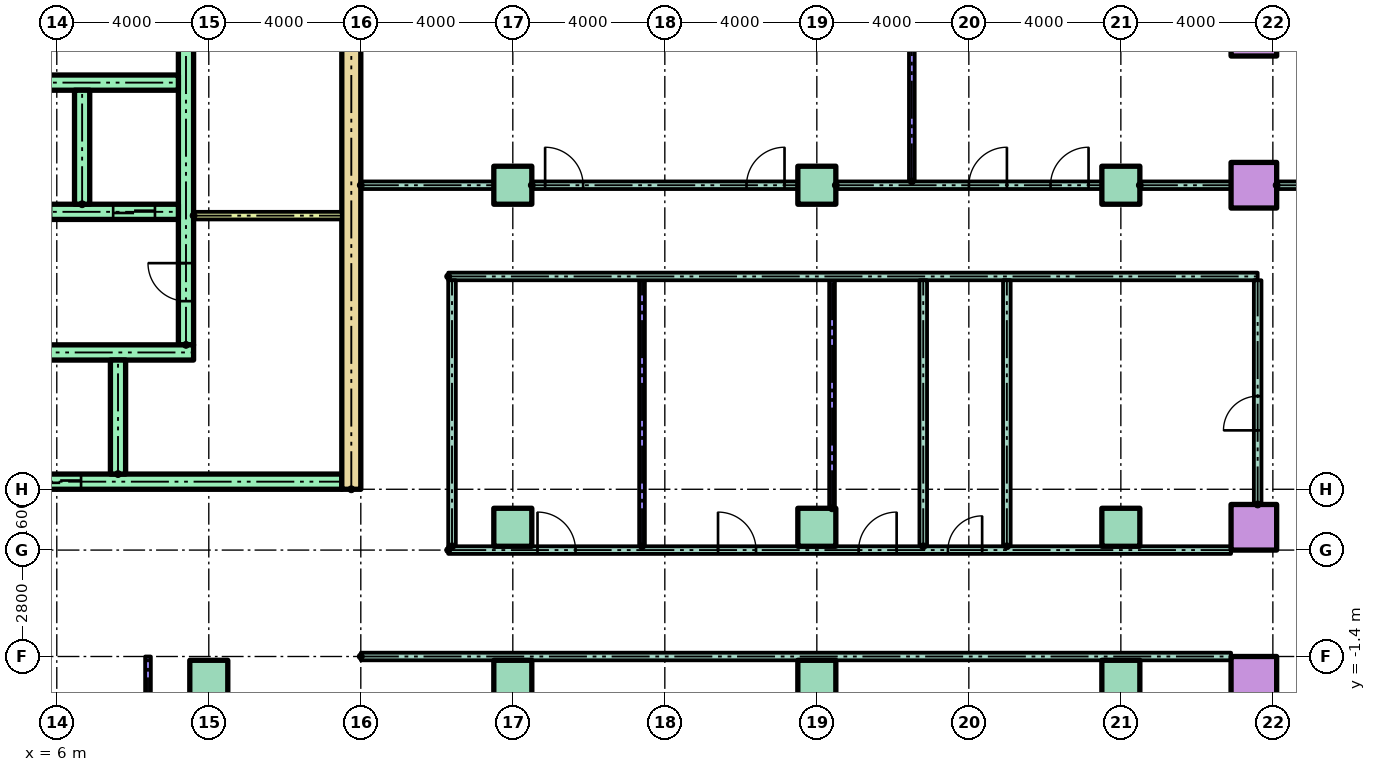
"""IFC4 building model, lengths in metres.
Left out: names, types, materials, properties, quantities, classifications, styles, units other than length and angle.
Written with IfcOpenShell. Run it as: python <this file> out.ifc"""

import sys

from ifc_helpers import new_model, si_unit, direction, frame, frame_2d, origin, origin_2d, place, context, subcontext, project, spatial, rectangle, hollow_rectangle, extrude, element, fill, save


model = new_model("IFC4")
c1 = context("Model", 3, precision=1e-05, world=origin(), true_north=direction((0.0, 1.0)))
c2 = subcontext(c1, "Body", "Model", "MODEL_VIEW")
j1 = project(units=[si_unit("LENGTHUNIT", "METRE"), si_unit("PLANEANGLEUNIT", "RADIAN")], contexts=[c1])
p1 = place(None, origin())
s1 = spatial("IfcSite", under=j1, at=p1, CompositionType="ELEMENT")
p2 = place(p1, origin())
s2 = spatial("IfcBuilding", under=s1, at=p2, CompositionType="ELEMENT")
p3 = place(p2, frame((0.0, 0.0, 22.0)))
s3 = spatial("IfcBuildingStorey", under=s2, at=p3, CompositionType="ELEMENT", Elevation=22.0)
for number, where in (
    (1, (10.0, -2.0, 0.0)),
    (2, (18.0, -2.0, 0.0)),
    (3, (26.0, -2.0, 0.0)),
    (4, (34.0, -2.0, 0.0)),
):
    element("IfcColumn", number, at=place(p3, frame(where)), inside=s3, PredefinedType="COLUMN", context=c2, shape_type="SweptSolid", body=[
        extrude(rectangle(XDim=1.0, YDim=1.0, at=origin_2d()), origin(), (0.0, 0.0, 1.0), 4.0),
    ])
p4 = place(p3, frame((37.5, -2.0, 0.0)))
e5 = element("IfcColumn", 5, at=p4, inside=s3, PredefinedType="COLUMN", context=c2, shape_type="SweptSolid", body=[
    extrude(hollow_rectangle(XDim=1.2, YDim=1.2, WallThickness=0.06, at=origin_2d()), origin(), (0.0, 0.0, 1.0), 4.0),
])
for number, where in (
    (6, (18.0, 2.0, 0.0)),
    (7, (26.0, 2.0, 0.0)),
    (8, (34.0, 2.0, 0.0)),
):
    element("IfcColumn", number, at=place(p3, frame(where)), inside=s3, PredefinedType="COLUMN", context=c2, shape_type="SweptSolid", body=[
        extrude(rectangle(XDim=1.0, YDim=1.0, at=origin_2d()), origin(), (0.0, 0.0, 1.0), 4.0),
    ])
p5 = place(p3, frame((37.5, 2.0, 0.0)))
e9 = element("IfcColumn", 9, at=p5, inside=s3, PredefinedType="COLUMN", context=c2, shape_type="SweptSolid", body=[
    extrude(hollow_rectangle(XDim=1.2, YDim=1.2, WallThickness=0.06, at=origin_2d()), origin(), (0.0, 0.0, 1.0), 4.0),
])
for number, where in (
    (10, (18.0, 11.0, 0.0)),
    (11, (26.0, 11.0, 0.0)),
    (12, (34.0, 11.0, 0.0)),
):
    element("IfcColumn", number, at=place(p3, frame(where)), inside=s3, PredefinedType="COLUMN", context=c2, shape_type="SweptSolid", body=[
        extrude(rectangle(XDim=1.0, YDim=1.0, at=origin_2d()), origin(), (0.0, 0.0, 1.0), 4.0),
    ])
for number, where in (
    (13, (37.5, 11.0, 0.0)),
    (14, (37.5, 15.0, 0.0)),
):
    element("IfcColumn", number, at=place(p3, frame(where)), inside=s3, PredefinedType="COLUMN", context=c2, shape_type="SweptSolid", body=[
        extrude(hollow_rectangle(XDim=1.2, YDim=1.2, WallThickness=0.06, at=origin_2d()), origin(), (0.0, 0.0, 1.0), 4.0),
    ])
p6 = place(p3, frame((13.75, 3.0, 0.0), z_axis=(0.0, 0.0, 1.0), x_axis=(0.0, 1.0, 0.0)))
e15 = element("IfcWall", 15, at=p6, inside=s3, PredefinedType="SHEAR", context=c2, shape_type="SweptSolid", body=[
    extrude(rectangle(XDim=17.0, YDim=0.5, at=frame_2d((8.5, 0.0))), origin(), (0.0, 0.0, 1.0), 3.2),
])
p7 = place(p3, frame((9.4, 6.8, 0.0), z_axis=(0.0, 0.0, 1.0), x_axis=(0.0, 1.0, 0.0)))
e16 = element("IfcWall", 16, at=p7, inside=s3, PredefinedType="SHEAR", context=c2, shape_type="SweptSolid", body=[
    extrude(rectangle(XDim=12.7, YDim=0.4, at=frame_2d((6.35, 0.0))), origin(), (0.0, 0.0, 1.0), 3.2),
])
p8 = place(p7, frame((1.15, 0.0, 0.0)))
e17 = element("IfcOpeningElement", 17, at=p8, cuts=e16, PredefinedType="OPENING", context=c2, shape_type="SweptSolid", body=[
    extrude(rectangle(XDim=1.0, YDim=2.1, at=frame_2d((0.5, 1.05))), frame((0.0, 0.21, 0.0), z_axis=(0.0, -1.0, 0.0), x_axis=(1.0, 0.0, 0.0)), (0.0, 0.0, 1.0), 0.42),
])
p9 = place(p7, frame((7.925, 0.0, 0.0)))
e18 = element("IfcOpeningElement", 18, at=p9, cuts=e16, PredefinedType="OPENING", context=c2, shape_type="SweptSolid", body=[
    extrude(rectangle(XDim=1.0, YDim=2.1, at=frame_2d((0.5, 1.05))), frame((0.0, 0.21, 0.0), z_axis=(0.0, -1.0, 0.0), x_axis=(1.0, 0.0, 0.0)), (0.0, 0.0, 1.0), 0.42),
])
p10 = place(p3, frame((-13.5, 3.2, 0.0)))
e19 = element("IfcWall", 19, at=p10, inside=s3, PredefinedType="SHEAR", context=c2, shape_type="SweptSolid", body=[
    extrude(rectangle(XDim=27.0, YDim=0.4, at=frame_2d((13.5, 0.0))), origin(), (0.0, 0.0, 1.0), 3.2),
])
p11 = place(p10, frame((6.861, 0.0, 0.0)))
e20 = element("IfcOpeningElement", 20, at=p11, cuts=e19, PredefinedType="OPENING", context=c2, shape_type="SweptSolid", body=[
    extrude(rectangle(XDim=1.1, YDim=2.1, at=frame_2d((0.55, 1.05))), frame((0.0, 0.21, 0.0), z_axis=(0.0, -1.0, 0.0), x_axis=(1.0, 0.0, 0.0)), (0.0, 0.0, 1.0), 0.42),
])
p12 = place(p10, frame((9.906, 0.0, 0.0)))
e21 = element("IfcOpeningElement", 21, at=p12, cuts=e19, PredefinedType="OPENING", context=c2, shape_type="SweptSolid", body=[
    extrude(rectangle(XDim=1.1, YDim=2.1, at=frame_2d((0.55, 1.05))), frame((0.0, 0.21, 0.0), z_axis=(0.0, -1.0, 0.0), x_axis=(1.0, 0.0, 0.0)), (0.0, 0.0, 1.0), 0.42),
])
p13 = place(p10, frame((15.994, 0.0, 0.0)))
e22 = element("IfcOpeningElement", 22, at=p13, cuts=e19, PredefinedType="OPENING", context=c2, shape_type="SweptSolid", body=[
    extrude(rectangle(XDim=1.1, YDim=2.1, at=frame_2d((0.55, 1.05))), frame((0.0, 0.21, 0.0), z_axis=(0.0, -1.0, 0.0), x_axis=(1.0, 0.0, 0.0)), (0.0, 0.0, 1.0), 0.42),
])
p14 = place(p10, frame((19.039, 0.0, 0.0)))
e23 = element("IfcOpeningElement", 23, at=p14, cuts=e19, PredefinedType="OPENING", context=c2, shape_type="SweptSolid", body=[
    extrude(rectangle(XDim=1.1, YDim=2.1, at=frame_2d((0.55, 1.05))), frame((0.0, 0.21, 0.0), z_axis=(0.0, -1.0, 0.0), x_axis=(1.0, 0.0, 0.0)), (0.0, 0.0, 1.0), 0.42),
])
p15 = place(p10, frame((12.6, 0.0, 0.0)))
e24 = element("IfcOpeningElement", 24, at=p15, cuts=e19, PredefinedType="OPENING", context=c2, shape_type="SweptSolid", body=[
    extrude(rectangle(XDim=1.8, YDim=2.1, at=frame_2d((0.9, 1.05))), frame((0.0, 0.21, 0.0), z_axis=(0.0, -1.0, 0.0), x_axis=(1.0, 0.0, 0.0)), (0.0, 0.0, 1.0), 0.42),
])
p16 = place(p3, frame((1.522, 6.6, 0.0)))
e25 = element("IfcWall", 25, at=p16, inside=s3, PredefinedType="SHEAR", context=c2, shape_type="SweptSolid", body=[
    extrude(rectangle(XDim=8.078, YDim=0.4, at=frame_2d((4.039, 0.0))), origin(), (0.0, 0.0, 1.0), 3.2),
])
p17 = place(p3, frame((7.611, 3.4, 0.0), z_axis=(0.0, 0.0, 1.0), x_axis=(0.0, 1.0, 0.0)))
e26 = element("IfcWall", 26, at=p17, inside=s3, PredefinedType="SHEAR", context=c2, shape_type="SweptSolid", body=[
    extrude(rectangle(XDim=3.0, YDim=0.4, at=frame_2d((1.5, 0.0))), origin(), (0.0, 0.0, 1.0), 3.2),
])
p18 = place(p3, frame((1.2, 10.3, 0.0)))
e27 = element("IfcWall", 27, at=p18, inside=s3, PredefinedType="SHEAR", context=c2, shape_type="SweptSolid", body=[
    extrude(rectangle(XDim=8.0, YDim=0.4, at=frame_2d((4.0, 0.0))), origin(), (0.0, 0.0, 1.0), 3.2),
])
p19 = place(p18, frame((3.55, 0.0, 0.0)))
e28 = element("IfcOpeningElement", 28, at=p19, cuts=e27, PredefinedType="OPENING", context=c2, shape_type="SweptSolid", body=[
    extrude(rectangle(XDim=1.1, YDim=2.1, at=frame_2d((0.55, 1.05))), frame((0.0, 0.21, 0.0), z_axis=(0.0, -1.0, 0.0), x_axis=(1.0, 0.0, 0.0)), (0.0, 0.0, 1.0), 0.42),
])
p20 = place(p18, frame((6.283, 0.0, 0.0)))
e29 = element("IfcOpeningElement", 29, at=p20, cuts=e27, PredefinedType="OPENING", context=c2, shape_type="SweptSolid", body=[
    extrude(rectangle(XDim=1.1, YDim=2.1, at=frame_2d((0.55, 1.05))), frame((0.0, 0.21, 0.0), z_axis=(0.0, -1.0, 0.0), x_axis=(1.0, 0.0, 0.0)), (0.0, 0.0, 1.0), 0.42),
])
p21 = place(p18, frame((0.867, 0.0, 0.0)))
e30 = element("IfcOpeningElement", 30, at=p21, cuts=e27, PredefinedType="OPENING", context=c2, shape_type="SweptSolid", body=[
    extrude(rectangle(XDim=1.0, YDim=2.1, at=frame_2d((0.5, 1.05))), frame((0.0, 0.21, 0.0), z_axis=(0.0, -1.0, 0.0), x_axis=(1.0, 0.0, 0.0)), (0.0, 0.0, 1.0), 0.42),
])
p22 = place(p3, frame((1.2, 13.7, 0.0)))
e31 = element("IfcWall", 31, at=p22, inside=s3, PredefinedType="SHEAR", context=c2, shape_type="SweptSolid", body=[
    extrude(rectangle(XDim=8.0, YDim=0.4, at=frame_2d((4.0, 0.0))), origin(), (0.0, 0.0, 1.0), 3.2),
])
p23 = place(p3, frame((6.667, 10.5, 0.0), z_axis=(0.0, 0.0, 1.0), x_axis=(0.0, 1.0, 0.0)))
e32 = element("IfcWall", 32, at=p23, inside=s3, PredefinedType="SHEAR", context=c2, shape_type="SweptSolid", body=[
    extrude(rectangle(XDim=3.0, YDim=0.4, at=frame_2d((1.5, 0.0))), origin(), (0.0, 0.0, 1.0), 3.2),
])
p24 = place(p3, frame((9.6, 10.2, 0.0)))
e33 = element("IfcWall", 33, at=p24, inside=s3, PredefinedType="PARTITIONING", context=c2, shape_type="SweptSolid", body=[
    extrude(rectangle(XDim=3.9, YDim=0.2, at=frame_2d((1.95, 0.0))), origin(), (0.0, 0.0, 1.0), 3.2),
])
p25 = place(p3, frame((14.0, -1.4, 0.0)))
e34 = element("IfcWall", 34, at=p25, inside=s3, PredefinedType="PARTITIONING", context=c2, shape_type="SweptSolid", body=[
    extrude(rectangle(XDim=22.9, YDim=0.2, at=frame_2d((11.45, 0.0))), origin(), (0.0, 0.0, 1.0), 3.2),
])
p26 = place(p3, frame((16.3, 1.4, 0.0)))
e35 = element("IfcWall", 35, at=p26, inside=s3, PredefinedType="PARTITIONING", context=c2, shape_type="SweptSolid", body=[
    extrude(rectangle(XDim=20.6, YDim=0.2, at=frame_2d((10.3, 0.0))), origin(), (0.0, 0.0, 1.0), 3.2),
])
p27 = place(p26, frame((2.35, 0.0, 0.0)))
e36 = element("IfcOpeningElement", 36, at=p27, cuts=e35, PredefinedType="OPENING", context=c2, shape_type="SweptSolid", body=[
    extrude(rectangle(XDim=1.0, YDim=2.1, at=frame_2d((0.5, 1.05))), frame((0.0, 0.11, 0.0), z_axis=(0.0, -1.0, 0.0), x_axis=(1.0, 0.0, 0.0)), (0.0, 0.0, 1.0), 0.22),
])
p28 = place(p26, frame((7.1, 0.0, 0.0)))
e37 = element("IfcOpeningElement", 37, at=p28, cuts=e35, PredefinedType="OPENING", context=c2, shape_type="SweptSolid", body=[
    extrude(rectangle(XDim=1.0, YDim=2.1, at=frame_2d((0.5, 1.05))), frame((0.0, 0.11, 0.0), z_axis=(0.0, -1.0, 0.0), x_axis=(1.0, 0.0, 0.0)), (0.0, 0.0, 1.0), 0.22),
])
p29 = place(p26, frame((10.8, 0.0, 0.0)))
e38 = element("IfcOpeningElement", 38, at=p29, cuts=e35, PredefinedType="OPENING", context=c2, shape_type="SweptSolid", body=[
    extrude(rectangle(XDim=1.0, YDim=2.1, at=frame_2d((0.5, 1.05))), frame((0.0, 0.11, 0.0), z_axis=(0.0, -1.0, 0.0), x_axis=(1.0, 0.0, 0.0)), (0.0, 0.0, 1.0), 0.22),
])
p30 = place(p26, frame((13.15, 0.0, 0.0)))
e39 = element("IfcOpeningElement", 39, at=p30, cuts=e35, PredefinedType="OPENING", context=c2, shape_type="SweptSolid", body=[
    extrude(rectangle(XDim=0.9, YDim=2.1, at=frame_2d((0.45, 1.05))), frame((0.0, 0.11, 0.0), z_axis=(0.0, -1.0, 0.0), x_axis=(1.0, 0.0, 0.0)), (0.0, 0.0, 1.0), 0.22),
])
p31 = place(p3, frame((16.3, 8.6, 0.0)))
e40 = element("IfcWall", 40, at=p31, inside=s3, PredefinedType="PARTITIONING", context=c2, shape_type="SweptSolid", body=[
    extrude(rectangle(XDim=21.3, YDim=0.2, at=frame_2d((10.65, 0.0))), origin(), (0.0, 0.0, 1.0), 3.2),
])
p32 = place(p3, frame((14.0, 11.0, 0.0)))
e41 = element("IfcWall", 41, at=p32, inside=s3, PredefinedType="PARTITIONING", context=c2, shape_type="SweptSolid", body=[
    extrude(rectangle(XDim=3.5, YDim=0.2, at=frame_2d((1.75, 0.0))), origin(), (0.0, 0.0, 1.0), 3.2),
])
p33 = place(p3, frame((18.5, 11.0, 0.0)))
e42 = element("IfcWall", 42, at=p33, inside=s3, PredefinedType="PARTITIONING", context=c2, shape_type="SweptSolid", body=[
    extrude(rectangle(XDim=7.0, YDim=0.2, at=frame_2d((3.5, 0.0))), origin(), (0.0, 0.0, 1.0), 3.2),
])
p34 = place(p33, frame((0.35, 0.0, 0.0)))
e43 = element("IfcOpeningElement", 43, at=p34, cuts=e42, PredefinedType="OPENING", context=c2, shape_type="SweptSolid", body=[
    extrude(rectangle(XDim=1.0, YDim=2.1, at=frame_2d((0.5, 1.05))), frame((0.0, 0.11, 0.0), z_axis=(0.0, -1.0, 0.0), x_axis=(1.0, 0.0, 0.0)), (0.0, 0.0, 1.0), 0.22),
])
p35 = place(p33, frame((5.65, 0.0, 0.0)))
e44 = element("IfcOpeningElement", 44, at=p35, cuts=e42, PredefinedType="OPENING", context=c2, shape_type="SweptSolid", body=[
    extrude(rectangle(XDim=1.0, YDim=2.1, at=frame_2d((0.5, 1.05))), frame((0.0, 0.11, 0.0), z_axis=(0.0, -1.0, 0.0), x_axis=(1.0, 0.0, 0.0)), (0.0, 0.0, 1.0), 0.22),
])
p36 = place(p3, frame((26.5, 11.0, 0.0)))
e45 = element("IfcWall", 45, at=p36, inside=s3, PredefinedType="PARTITIONING", context=c2, shape_type="SweptSolid", body=[
    extrude(rectangle(XDim=7.0, YDim=0.2, at=frame_2d((3.5, 0.0))), origin(), (0.0, 0.0, 1.0), 3.2),
])
p37 = place(p36, frame((3.502, 0.0, 0.0)))
e46 = element("IfcOpeningElement", 46, at=p37, cuts=e45, PredefinedType="OPENING", context=c2, shape_type="SweptSolid", body=[
    extrude(rectangle(XDim=1.0, YDim=2.1, at=frame_2d((0.5, 1.05))), frame((0.0, 0.11, 0.0), z_axis=(0.0, -1.0, 0.0), x_axis=(1.0, 0.0, 0.0)), (0.0, 0.0, 1.0), 0.22),
])
p38 = place(p36, frame((5.65, 0.0, 0.0)))
e47 = element("IfcOpeningElement", 47, at=p38, cuts=e45, PredefinedType="OPENING", context=c2, shape_type="SweptSolid", body=[
    extrude(rectangle(XDim=1.0, YDim=2.1, at=frame_2d((0.5, 1.05))), frame((0.0, 0.11, 0.0), z_axis=(0.0, -1.0, 0.0), x_axis=(1.0, 0.0, 0.0)), (0.0, 0.0, 1.0), 0.22),
])
p39 = place(p3, frame((34.5, 11.0, 0.0)))
e48 = element("IfcWall", 48, at=p39, inside=s3, PredefinedType="PARTITIONING", context=c2, shape_type="SweptSolid", body=[
    extrude(rectangle(XDim=2.4, YDim=0.2, at=frame_2d((1.2, 0.0))), origin(), (0.0, 0.0, 1.0), 3.2),
])
p40 = place(p3, frame((38.1, 11.0, 0.0)))
e49 = element("IfcWall", 49, at=p40, inside=s3, PredefinedType="PARTITIONING", context=c2, shape_type="SweptSolid", body=[
    extrude(rectangle(XDim=1.5, YDim=0.2, at=frame_2d((0.75, 0.0))), origin(), (0.0, 0.0, 1.0), 3.2),
])
p41 = place(p3, frame((8.4, -6.25, 0.0), z_axis=(0.0, 0.0, 1.0), x_axis=(0.0, 1.0, 0.0)))
e50 = element("IfcWall", 50, at=p41, inside=s3, PredefinedType="PARTITIONING", context=c2, shape_type="SweptSolid", body=[
    extrude(rectangle(XDim=4.85, YDim=0.15, at=frame_2d((2.425, 0.0))), origin(), (0.0, 0.0, 1.0), 3.2),
])
p42 = place(p3, frame((16.4, 1.5, 0.0), z_axis=(0.0, 0.0, 1.0), x_axis=(0.0, 1.0, 0.0)))
e51 = element("IfcWall", 51, at=p42, inside=s3, PredefinedType="PARTITIONING", context=c2, shape_type="SweptSolid", body=[
    extrude(rectangle(XDim=7.0, YDim=0.2, at=frame_2d((3.5, 0.0))), origin(), (0.0, 0.0, 1.0), 3.2),
])
p43 = place(p3, frame((21.4, 1.5, 0.0), z_axis=(0.0, 0.0, 1.0), x_axis=(0.0, 1.0, 0.0)))
e52 = element("IfcWall", 52, at=p43, inside=s3, PredefinedType="PARTITIONING", context=c2, shape_type="SweptSolid", body=[
    extrude(rectangle(XDim=7.0, YDim=0.15, at=frame_2d((3.5, 0.0))), origin(), (0.0, 0.0, 1.0), 3.2),
])
p44 = place(p3, frame((26.4, 2.5, 0.0), z_axis=(0.0, 0.0, 1.0), x_axis=(0.0, 1.0, 0.0)))
e53 = element("IfcWall", 53, at=p44, inside=s3, PredefinedType="PARTITIONING", context=c2, shape_type="SweptSolid", body=[
    extrude(rectangle(XDim=6.0, YDim=0.15, at=frame_2d((3.0, 0.0))), origin(), (0.0, 0.0, 1.0), 3.2),
])
p45 = place(p3, frame((28.5, 11.1, 0.0), z_axis=(0.0, 0.0, 1.0), x_axis=(0.0, 1.0, 0.0)))
e54 = element("IfcWall", 54, at=p45, inside=s3, PredefinedType="PARTITIONING", context=c2, shape_type="SweptSolid", body=[
    extrude(rectangle(XDim=8.5, YDim=0.15, at=frame_2d((4.25, 0.0))), origin(), (0.0, 0.0, 1.0), 3.2),
])
for number, where, z_axis, x_axis in (
    (55, (28.8, 1.5, 0.0), (0.0, 0.0, 1.0), (0.0, 1.0, 0.0)),
    (56, (31.0, 1.5, 0.0), (0.0, 0.0, 1.0), (0.0, 1.0, 0.0)),
):
    element("IfcWall", number, at=place(p3, frame(where, z_axis=z_axis, x_axis=x_axis)), inside=s3, PredefinedType="PARTITIONING", context=c2, shape_type="SweptSolid", body=[
        extrude(rectangle(XDim=7.0, YDim=0.2, at=frame_2d((3.5, 0.0))), origin(), (0.0, 0.0, 1.0), 3.2),
    ])
p46 = place(p3, frame((37.6, 2.6, 0.0), z_axis=(0.0, 0.0, 1.0), x_axis=(0.0, 1.0, 0.0)))
e57 = element("IfcWall", 57, at=p46, inside=s3, PredefinedType="PARTITIONING", context=c2, shape_type="SweptSolid", body=[
    extrude(rectangle(XDim=5.9, YDim=0.2, at=frame_2d((2.95, 0.0))), origin(), (0.0, 0.0, 1.0), 3.2),
])
p47 = place(p46, frame((1.95, 0.0, 0.0)))
e58 = element("IfcOpeningElement", 58, at=p47, cuts=e57, PredefinedType="OPENING", context=c2, shape_type="SweptSolid", body=[
    extrude(rectangle(XDim=0.9, YDim=2.1, at=frame_2d((0.45, 1.05))), frame((0.0, 0.11, 0.0), z_axis=(0.0, -1.0, 0.0), x_axis=(1.0, 0.0, 0.0)), (0.0, 0.0, 1.0), 0.22),
])
p48 = place(p14, origin())
e59 = element("IfcDoor", 59, at=p48, inside=s3, OperationType="SLIDING_TO_LEFT", PredefinedType="DOOR", context=c2, shape_type="SweptSolid", body=[
    extrude(rectangle(XDim=1.1, YDim=2.1, at=frame_2d((0.55, 1.05))), frame((0.0, 0.025, 0.0), z_axis=(0.0, -1.0, 0.0), x_axis=(1.0, 0.0, 0.0)), (0.0, 0.0, 1.0), 0.05),
])
fill(e23, e59)
p49 = place(p20, origin())
e60 = element("IfcDoor", 60, at=p49, inside=s3, OperationType="SLIDING_TO_LEFT", PredefinedType="DOOR", context=c2, shape_type="SweptSolid", body=[
    extrude(rectangle(XDim=1.1, YDim=2.1, at=frame_2d((0.55, 1.05))), frame((0.0, 0.025, 0.0), z_axis=(0.0, -1.0, 0.0), x_axis=(1.0, 0.0, 0.0)), (0.0, 0.0, 1.0), 0.05),
])
fill(e29, e60)
p50 = place(p8, origin())
e61 = element("IfcDoor", 61, at=p50, inside=s3, OperationType="SINGLE_SWING_RIGHT", PredefinedType="DOOR", context=c2, shape_type="SweptSolid", body=[
    extrude(rectangle(XDim=1.0, YDim=2.1, at=frame_2d((0.5, 1.05))), frame((0.0, 0.025, 0.0), z_axis=(0.0, -1.0, 0.0), x_axis=(1.0, 0.0, 0.0)), (0.0, 0.0, 1.0), 0.05),
])
fill(e17, e61)
p51 = place(p27, origin())
e62 = element("IfcDoor", 62, at=p51, inside=s3, OperationType="SINGLE_SWING_LEFT", PredefinedType="DOOR", context=c2, shape_type="SweptSolid", body=[
    extrude(rectangle(XDim=1.0, YDim=2.1, at=frame_2d((0.5, 1.05))), frame((0.0, 0.025, 0.0), z_axis=(0.0, -1.0, 0.0), x_axis=(1.0, 0.0, 0.0)), (0.0, 0.0, 1.0), 0.05),
])
fill(e36, e62)
p52 = place(p28, origin())
e63 = element("IfcDoor", 63, at=p52, inside=s3, OperationType="SINGLE_SWING_LEFT", PredefinedType="DOOR", context=c2, shape_type="SweptSolid", body=[
    extrude(rectangle(XDim=1.0, YDim=2.1, at=frame_2d((0.5, 1.05))), frame((0.0, 0.025, 0.0), z_axis=(0.0, -1.0, 0.0), x_axis=(1.0, 0.0, 0.0)), (0.0, 0.0, 1.0), 0.05),
])
fill(e37, e63)
p53 = place(p29, origin())
e64 = element("IfcDoor", 64, at=p53, inside=s3, OperationType="SINGLE_SWING_RIGHT", PredefinedType="DOOR", context=c2, shape_type="SweptSolid", body=[
    extrude(rectangle(XDim=1.0, YDim=2.1, at=frame_2d((0.5, 1.05))), frame((0.0, 0.025, 0.0), z_axis=(0.0, -1.0, 0.0), x_axis=(1.0, 0.0, 0.0)), (0.0, 0.0, 1.0), 0.05),
])
fill(e38, e64)
p54 = place(p30, origin())
e65 = element("IfcDoor", 65, at=p54, inside=s3, OperationType="SINGLE_SWING_RIGHT", PredefinedType="DOOR", context=c2, shape_type="SweptSolid", body=[
    extrude(rectangle(XDim=0.9, YDim=2.1, at=frame_2d((0.45, 1.05))), frame((0.0, 0.025, 0.0), z_axis=(0.0, -1.0, 0.0), x_axis=(1.0, 0.0, 0.0)), (0.0, 0.0, 1.0), 0.05),
])
fill(e39, e65)
p55 = place(p47, origin())
e66 = element("IfcDoor", 66, at=p55, inside=s3, OperationType="SINGLE_SWING_LEFT", PredefinedType="DOOR", context=c2, shape_type="SweptSolid", body=[
    extrude(rectangle(XDim=0.9, YDim=2.1, at=frame_2d((0.45, 1.05))), frame((0.0, 0.025, 0.0), z_axis=(0.0, -1.0, 0.0), x_axis=(1.0, 0.0, 0.0)), (0.0, 0.0, 1.0), 0.05),
])
fill(e58, e66)
p56 = place(p34, origin())
e67 = element("IfcDoor", 67, at=p56, inside=s3, OperationType="SINGLE_SWING_LEFT", PredefinedType="DOOR", context=c2, shape_type="SweptSolid", body=[
    extrude(rectangle(XDim=1.0, YDim=2.1, at=frame_2d((0.5, 1.05))), frame((0.0, 0.025, 0.0), z_axis=(0.0, -1.0, 0.0), x_axis=(1.0, 0.0, 0.0)), (0.0, 0.0, 1.0), 0.05),
])
fill(e43, e67)
p57 = place(p35, origin())
e68 = element("IfcDoor", 68, at=p57, inside=s3, OperationType="SINGLE_SWING_RIGHT", PredefinedType="DOOR", context=c2, shape_type="SweptSolid", body=[
    extrude(rectangle(XDim=1.0, YDim=2.1, at=frame_2d((0.5, 1.05))), frame((0.0, 0.025, 0.0), z_axis=(0.0, -1.0, 0.0), x_axis=(1.0, 0.0, 0.0)), (0.0, 0.0, 1.0), 0.05),
])
fill(e44, e68)
p58 = place(p37, origin())
e69 = element("IfcDoor", 69, at=p58, inside=s3, OperationType="SINGLE_SWING_RIGHT", PredefinedType="DOOR", context=c2, shape_type="SweptSolid", body=[
    extrude(rectangle(XDim=1.0, YDim=2.1, at=frame_2d((0.5, 1.05))), frame((0.0, 0.025, 0.0), z_axis=(0.0, -1.0, 0.0), x_axis=(1.0, 0.0, 0.0)), (0.0, 0.0, 1.0), 0.05),
])
fill(e46, e69)
p59 = place(p38, origin())
e70 = element("IfcDoor", 70, at=p59, inside=s3, OperationType="SINGLE_SWING_RIGHT", PredefinedType="DOOR", context=c2, shape_type="SweptSolid", body=[
    extrude(rectangle(XDim=1.0, YDim=2.1, at=frame_2d((0.5, 1.05))), frame((0.0, 0.025, 0.0), z_axis=(0.0, -1.0, 0.0), x_axis=(1.0, 0.0, 0.0)), (0.0, 0.0, 1.0), 0.05),
])
fill(e47, e70)
save(model, sys.argv[1])
